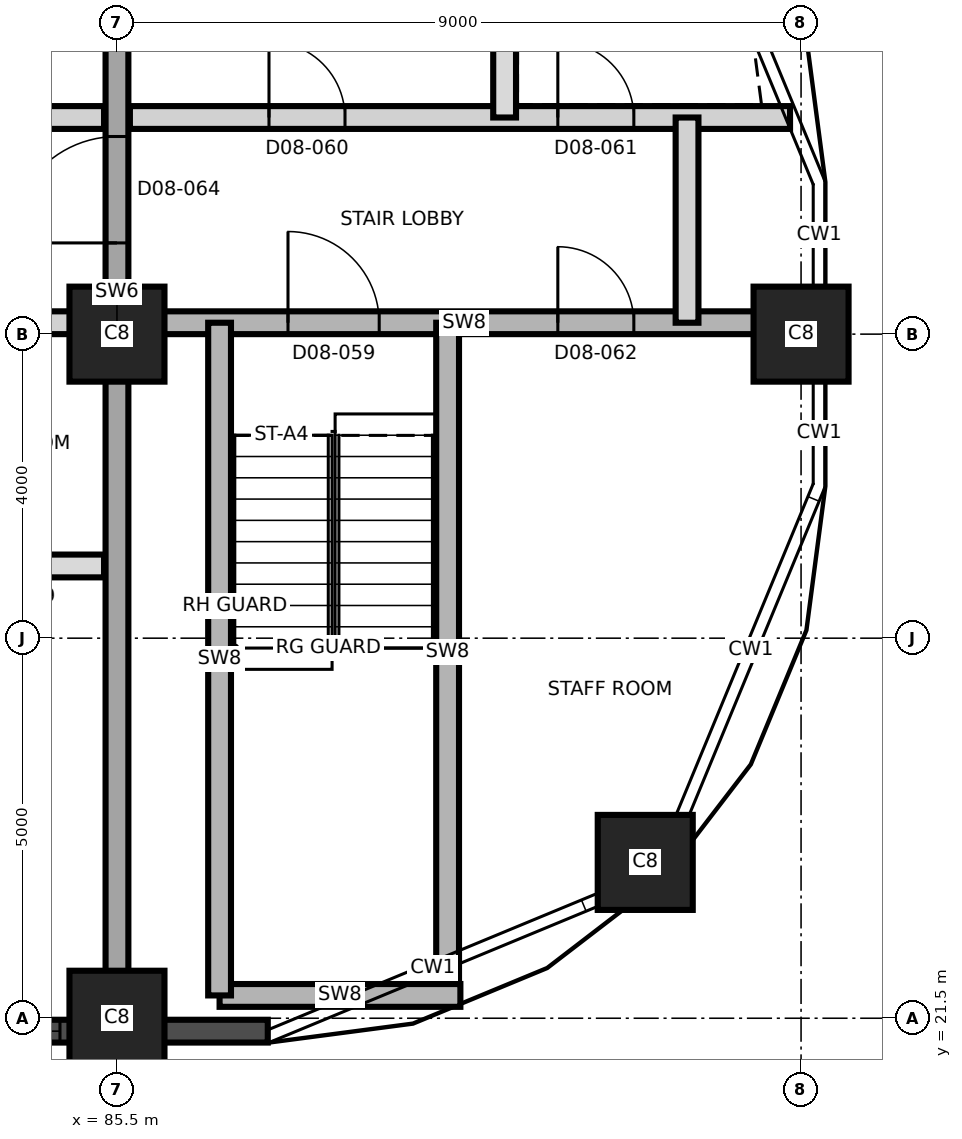
"""IFC4 building model, lengths in metres.
Left out: names, types, materials, properties, quantities, classifications, styles, units other than length and angle.
Written with IfcOpenShell. Run it as: python <this file> out.ifc"""

import sys

from ifc_helpers import new_model, si_unit, direction, frame, frame_2d, origin, origin_2d, place, context, subcontext, project, spatial, rectangle, extrude, element, fill, save


model = new_model("IFC4")
c1 = context("Model", 3, precision=1e-05, world=origin(), true_north=direction((0.0, 1.0)))
c2 = subcontext(c1, "Body", "Model", "MODEL_VIEW")
j1 = project(units=[si_unit("LENGTHUNIT", "METRE"), si_unit("PLANEANGLEUNIT", "RADIAN")], contexts=[c1])
p1 = place(None, origin())
s1 = spatial("IfcSite", under=j1, at=p1, CompositionType="ELEMENT")
p2 = place(p1, origin())
s2 = spatial("IfcBuilding", under=s1, at=p2, CompositionType="ELEMENT")
p3 = place(p2, frame((0.0, 0.0, 98.2)))
s3 = spatial("IfcBuildingStorey", under=s2, at=p3, CompositionType="ELEMENT", Elevation=98.2)
for number, where, z_axis, x_axis in (
    (1, (85.5, 21.5, 0.0), (0.0, 0.0, 1.0), (1.0, 0.0, 0.0)),
    (2, (92.45, 23.55, 0.0), (0.0, 0.0, 1.0), (1.0, 0.0, 0.0)),
    (3, (85.5, 30.5, 0.0), (0.0, 0.0, 1.0), (1.0, 0.0, 0.0)),
    (4, (94.5, 30.5, 0.0), (0.0, 0.0, 1.0), (1.0, 0.0, 0.0)),
):
    element("IfcColumn", number, at=place(p3, frame(where, z_axis=z_axis, x_axis=x_axis)), inside=s3, PredefinedType="COLUMN", context=c2, shape_type="SweptSolid", body=[
        extrude(rectangle(XDim=1.25, YDim=1.25, at=origin_2d()), origin(), (0.0, 0.0, 1.0), 3.7),
    ])
p4 = place(p3, frame((85.5, 21.53, 0.0), z_axis=(0.0, 0.0, 1.0), x_axis=(0.0, 1.0, 0.0)))
e5 = element("IfcWall", 5, at=p4, inside=s3, PredefinedType="SHEAR", context=c2, shape_type="SweptSolid", body=[
    extrude(rectangle(XDim=17.94, YDim=0.3, at=frame_2d((8.97, 0.0))), origin(), (0.0, 0.0, 1.0), 3.7),
])
p5 = place(p4, frame((10.17, 0.0, 0.0)))
e6 = element("IfcOpeningElement", 6, at=p5, cuts=e5, PredefinedType="OPENING", context=c2, shape_type="SweptSolid", body=[
    extrude(rectangle(XDim=1.4, YDim=2.1, at=frame_2d((0.7, 1.05))), frame((0.0, 0.16, 0.0), z_axis=(0.0, -1.0, 0.0), x_axis=(1.0, 0.0, 0.0)), (0.0, 0.0, 1.0), 0.32),
])
p6 = place(p3, frame((75.875, 21.33, 0.0), z_axis=(0.0, 0.0, 1.0), x_axis=(1.0, 0.0, 0.0)))
e7 = element("IfcWall", 7, at=p6, inside=s3, PredefinedType="SOLIDWALL", context=c2, shape_type="SweptSolid", body=[
    extrude(rectangle(XDim=11.609, YDim=0.3, at=frame_2d((5.805, 0.0))), origin(), (0.0, 0.0, 1.0), 3.4),
])
p7 = place(p6, frame((1.375, 0.0, 0.9)))
e8 = element("IfcOpeningElement", 8, at=p7, cuts=e7, PredefinedType="OPENING", context=c2, shape_type="SweptSolid", body=[
    extrude(rectangle(XDim=3.6, YDim=1.5, at=frame_2d((1.8, 0.75))), frame((0.0, 0.16, 0.0), z_axis=(0.0, -1.0, 0.0), x_axis=(1.0, 0.0, 0.0)), (0.0, 0.0, 1.0), 0.32),
])
p8 = place(p6, frame((5.275, 0.0, 0.9)))
e9 = element("IfcOpeningElement", 9, at=p8, cuts=e7, PredefinedType="OPENING", context=c2, shape_type="SweptSolid", body=[
    extrude(rectangle(XDim=3.6, YDim=1.5, at=frame_2d((1.8, 0.75))), frame((0.0, 0.16, 0.0), z_axis=(0.0, -1.0, 0.0), x_axis=(1.0, 0.0, 0.0)), (0.0, 0.0, 1.0), 0.32),
])
p9 = place(p3, frame((86.85, 21.8, 0.0), z_axis=(0.0, 0.0, 1.0), x_axis=(1.0, 0.0, 0.0)))
e10 = element("IfcWall", 10, at=p9, inside=s3, PredefinedType="SHEAR", context=c2, shape_type="SweptSolid", body=[
    extrude(rectangle(XDim=3.168, YDim=0.3, at=frame_2d((1.584, 0.0))), origin(), (0.0, 0.0, 1.0), 3.4),
])
p10 = place(p3, frame((82.8, 27.45, 0.0), z_axis=(0.0, 0.0, 1.0), x_axis=(1.0, 0.0, 0.0)))
e11 = element("IfcWall", 11, at=p10, inside=s3, PredefinedType="PARTITIONING", context=c2, shape_type="SweptSolid", body=[
    extrude(rectangle(XDim=2.53, YDim=0.3, at=frame_2d((1.265, 0.0))), origin(), (0.0, 0.0, 1.0), 3.4),
])
p11 = place(p10, frame((0.95, 0.0, 0.0)))
e12 = element("IfcOpeningElement", 12, at=p11, cuts=e11, PredefinedType="OPENING", context=c2, shape_type="SweptSolid", body=[
    extrude(rectangle(XDim=0.8, YDim=2.1, at=frame_2d((0.4, 1.05))), frame((0.0, 0.16, 0.0), z_axis=(0.0, -1.0, 0.0), x_axis=(1.0, 0.0, 0.0)), (0.0, 0.0, 1.0), 0.32),
])
p12 = place(p3, frame((58.8, 30.65, 0.0), z_axis=(0.0, 0.0, 1.0), x_axis=(1.0, 0.0, 0.0)))
e13 = element("IfcWall", 13, at=p12, inside=s3, PredefinedType="PARTITIONING", context=c2, shape_type="SweptSolid", body=[
    extrude(rectangle(XDim=26.53, YDim=0.3, at=frame_2d((13.265, 0.0))), origin(), (0.0, 0.0, 1.0), 3.4),
])
p13 = place(p12, frame((2.05, 0.0, 0.0)))
e14 = element("IfcOpeningElement", 14, at=p13, cuts=e13, PredefinedType="OPENING", context=c2, shape_type="SweptSolid", body=[
    extrude(rectangle(XDim=1.0, YDim=2.4, at=frame_2d((0.5, 1.2))), frame((0.0, 0.16, 0.0), z_axis=(0.0, -1.0, 0.0), x_axis=(1.0, 0.0, 0.0)), (0.0, 0.0, 1.0), 0.32),
])
p14 = place(p12, frame((9.85, 0.0, 0.0)))
e15 = element("IfcOpeningElement", 15, at=p14, cuts=e13, PredefinedType="OPENING", context=c2, shape_type="SweptSolid", body=[
    extrude(rectangle(XDim=1.0, YDim=2.1, at=frame_2d((0.5, 1.05))), frame((0.0, 0.16, 0.0), z_axis=(0.0, -1.0, 0.0), x_axis=(1.0, 0.0, 0.0)), (0.0, 0.0, 1.0), 0.32),
])
p15 = place(p12, frame((15.7, 0.0, 0.0)))
e16 = element("IfcOpeningElement", 16, at=p15, cuts=e13, PredefinedType="OPENING", context=c2, shape_type="SweptSolid", body=[
    extrude(rectangle(XDim=1.0, YDim=2.1, at=frame_2d((0.5, 1.05))), frame((0.0, 0.16, 0.0), z_axis=(0.0, -1.0, 0.0), x_axis=(1.0, 0.0, 0.0)), (0.0, 0.0, 1.0), 0.32),
])
p16 = place(p12, frame((18.835, 0.0, 0.0)))
e17 = element("IfcOpeningElement", 17, at=p16, cuts=e13, PredefinedType="OPENING", context=c2, shape_type="SweptSolid", body=[
    extrude(rectangle(XDim=1.2, YDim=2.1, at=frame_2d((0.6, 1.05))), frame((0.0, 0.16, 0.0), z_axis=(0.0, -1.0, 0.0), x_axis=(1.0, 0.0, 0.0)), (0.0, 0.0, 1.0), 0.32),
])
p17 = place(p12, frame((22.085, 0.0, 0.0)))
e18 = element("IfcOpeningElement", 18, at=p17, cuts=e13, PredefinedType="OPENING", context=c2, shape_type="SweptSolid", body=[
    extrude(rectangle(XDim=1.0, YDim=2.1, at=frame_2d((0.5, 1.05))), frame((0.0, 0.16, 0.0), z_axis=(0.0, -1.0, 0.0), x_axis=(1.0, 0.0, 0.0)), (0.0, 0.0, 1.0), 0.32),
])
p18 = place(p3, frame((85.67, 30.65, 0.0), z_axis=(0.0, 0.0, 1.0), x_axis=(1.0, 0.0, 0.0)))
e19 = element("IfcWall", 19, at=p18, inside=s3, PredefinedType="SHEAR", context=c2, shape_type="SweptSolid", body=[
    extrude(rectangle(XDim=8.8, YDim=0.3, at=frame_2d((4.4, 0.0))), origin(), (0.0, 0.0, 1.0), 3.4),
])
p19 = place(p18, frame((2.08, 0.0, 0.0)))
e20 = element("IfcOpeningElement", 20, at=p19, cuts=e19, PredefinedType="OPENING", context=c2, shape_type="SweptSolid", body=[
    extrude(rectangle(XDim=1.2, YDim=2.1, at=frame_2d((0.6, 1.05))), frame((0.0, 0.16, 0.0), z_axis=(0.0, -1.0, 0.0), x_axis=(1.0, 0.0, 0.0)), (0.0, 0.0, 1.0), 0.32),
])
p20 = place(p18, frame((5.63, 0.0, 0.0)))
e21 = element("IfcOpeningElement", 21, at=p20, cuts=e19, PredefinedType="OPENING", context=c2, shape_type="SweptSolid", body=[
    extrude(rectangle(XDim=1.0, YDim=2.1, at=frame_2d((0.5, 1.05))), frame((0.0, 0.16, 0.0), z_axis=(0.0, -1.0, 0.0), x_axis=(1.0, 0.0, 0.0)), (0.0, 0.0, 1.0), 0.32),
])
p21 = place(p3, frame((58.8, 33.35, 0.0), z_axis=(0.0, 0.0, 1.0), x_axis=(1.0, 0.0, 0.0)))
e22 = element("IfcWall", 22, at=p21, inside=s3, PredefinedType="PARTITIONING", context=c2, shape_type="SweptSolid", body=[
    extrude(rectangle(XDim=26.53, YDim=0.3, at=frame_2d((13.265, 0.0))), origin(), (0.0, 0.0, 1.0), 3.4),
])
p22 = place(p21, frame((2.75, 0.0, 0.0)))
e23 = element("IfcOpeningElement", 23, at=p22, cuts=e22, PredefinedType="OPENING", context=c2, shape_type="SweptSolid", body=[
    extrude(rectangle(XDim=1.0, YDim=2.1, at=frame_2d((0.5, 1.05))), frame((0.0, 0.16, 0.0), z_axis=(0.0, -1.0, 0.0), x_axis=(1.0, 0.0, 0.0)), (0.0, 0.0, 1.0), 0.32),
])
p23 = place(p21, frame((5.7, 0.0, 0.0)))
e24 = element("IfcOpeningElement", 24, at=p23, cuts=e22, PredefinedType="OPENING", context=c2, shape_type="SweptSolid", body=[
    extrude(rectangle(XDim=1.4, YDim=2.1, at=frame_2d((0.7, 1.05))), frame((0.0, 0.16, 0.0), z_axis=(0.0, -1.0, 0.0), x_axis=(1.0, 0.0, 0.0)), (0.0, 0.0, 1.0), 0.32),
])
p24 = place(p21, frame((14.35, 0.0, 0.0)))
e25 = element("IfcOpeningElement", 25, at=p24, cuts=e22, PredefinedType="OPENING", context=c2, shape_type="SweptSolid", body=[
    extrude(rectangle(XDim=1.0, YDim=2.4, at=frame_2d((0.5, 1.2))), frame((0.0, 0.16, 0.0), z_axis=(0.0, -1.0, 0.0), x_axis=(1.0, 0.0, 0.0)), (0.0, 0.0, 1.0), 0.32),
])
p25 = place(p21, frame((18.835, 0.0, 0.0)))
e26 = element("IfcOpeningElement", 26, at=p25, cuts=e22, PredefinedType="OPENING", context=c2, shape_type="SweptSolid", body=[
    extrude(rectangle(XDim=1.2, YDim=2.1, at=frame_2d((0.6, 1.05))), frame((0.0, 0.16, 0.0), z_axis=(0.0, -1.0, 0.0), x_axis=(1.0, 0.0, 0.0)), (0.0, 0.0, 1.0), 0.32),
])
p26 = place(p21, frame((22.085, 0.0, 0.0)))
e27 = element("IfcOpeningElement", 27, at=p26, cuts=e22, PredefinedType="OPENING", context=c2, shape_type="SweptSolid", body=[
    extrude(rectangle(XDim=1.0, YDim=2.1, at=frame_2d((0.5, 1.05))), frame((0.0, 0.16, 0.0), z_axis=(0.0, -1.0, 0.0), x_axis=(1.0, 0.0, 0.0)), (0.0, 0.0, 1.0), 0.32),
])
p27 = place(p3, frame((85.67, 33.35, 0.0), z_axis=(0.0, 0.0, 1.0), x_axis=(1.0, 0.0, 0.0)))
e28 = element("IfcWall", 28, at=p27, inside=s3, PredefinedType="PARTITIONING", context=c2, shape_type="SweptSolid", body=[
    extrude(rectangle(XDim=8.685, YDim=0.3, at=frame_2d((4.343, 0.0))), origin(), (0.0, 0.0, 1.0), 3.4),
])
p28 = place(p27, frame((1.83, 0.0, 0.0)))
e29 = element("IfcOpeningElement", 29, at=p28, cuts=e28, PredefinedType="OPENING", context=c2, shape_type="SweptSolid", body=[
    extrude(rectangle(XDim=1.0, YDim=2.1, at=frame_2d((0.5, 1.05))), frame((0.0, 0.16, 0.0), z_axis=(0.0, -1.0, 0.0), x_axis=(1.0, 0.0, 0.0)), (0.0, 0.0, 1.0), 0.32),
])
p29 = place(p27, frame((5.63, 0.0, 0.0)))
e30 = element("IfcOpeningElement", 30, at=p29, cuts=e28, PredefinedType="OPENING", context=c2, shape_type="SweptSolid", body=[
    extrude(rectangle(XDim=1.0, YDim=2.1, at=frame_2d((0.5, 1.05))), frame((0.0, 0.16, 0.0), z_axis=(0.0, -1.0, 0.0), x_axis=(1.0, 0.0, 0.0)), (0.0, 0.0, 1.0), 0.32),
])
p30 = place(p3, frame((86.85, 21.8, 0.0), z_axis=(0.0, 0.0, 1.0), x_axis=(0.0, 1.0, 0.0)))
e31 = element("IfcWall", 31, at=p30, inside=s3, PredefinedType="SHEAR", context=c2, shape_type="SweptSolid", body=[
    extrude(rectangle(XDim=8.85, YDim=0.3, at=frame_2d((4.425, 0.0))), origin(), (0.0, 0.0, 1.0), 3.4),
])
p31 = place(p3, frame((89.85, 21.997, 0.0), z_axis=(0.0, 0.0, 1.0), x_axis=(0.0, 1.0, 0.0)))
e32 = element("IfcWall", 32, at=p31, inside=s3, PredefinedType="SHEAR", context=c2, shape_type="SweptSolid", body=[
    extrude(rectangle(XDim=8.653, YDim=0.3, at=frame_2d((4.326, 0.0))), origin(), (0.0, 0.0, 1.0), 3.4),
])
p32 = place(p3, frame((90.6, 33.35, 0.0), z_axis=(0.0, 0.0, 1.0), x_axis=(0.0, 1.0, 0.0)))
e33 = element("IfcWall", 33, at=p32, inside=s3, PredefinedType="PARTITIONING", context=c2, shape_type="SweptSolid", body=[
    extrude(rectangle(XDim=5.603, YDim=0.3, at=frame_2d((2.801, 0.0))), origin(), (0.0, 0.0, 1.0), 3.4),
])
p33 = place(p3, frame((93.0, 30.65, 0.0), z_axis=(0.0, 0.0, 1.0), x_axis=(0.0, 1.0, 0.0)))
e34 = element("IfcWall", 34, at=p33, inside=s3, PredefinedType="PARTITIONING", context=c2, shape_type="SweptSolid", body=[
    extrude(rectangle(XDim=2.7, YDim=0.3, at=frame_2d((1.35, 0.0))), origin(), (0.0, 0.0, 1.0), 3.4),
])
p34 = place(p8, origin())
e35 = element("IfcWindow", 35, at=p34, inside=s3, PartitioningType="SINGLE_PANEL", PredefinedType="WINDOW", context=c2, shape_type="SweptSolid", body=[
    extrude(rectangle(XDim=3.6, YDim=1.5, at=frame_2d((1.8, 0.75))), frame((0.0, 0.03, 0.0), z_axis=(0.0, -1.0, 0.0), x_axis=(1.0, 0.0, 0.0)), (0.0, 0.0, 1.0), 0.06),
])
fill(e9, e35)
p35 = place(p19, origin())
e36 = element("IfcDoor", 36, at=p35, inside=s3, OperationType="SINGLE_SWING_LEFT", PredefinedType="DOOR", context=c2, shape_type="SweptSolid", body=[
    extrude(rectangle(XDim=1.2, YDim=2.1, at=frame_2d((0.6, 1.05))), frame((0.0, 0.025, 0.0), z_axis=(0.0, -1.0, 0.0), x_axis=(1.0, 0.0, 0.0)), (0.0, 0.0, 1.0), 0.05),
])
fill(e20, e36)
p36 = place(p28, origin())
e37 = element("IfcDoor", 37, at=p36, inside=s3, OperationType="SINGLE_SWING_LEFT", PredefinedType="DOOR", context=c2, shape_type="SweptSolid", body=[
    extrude(rectangle(XDim=1.0, YDim=2.1, at=frame_2d((0.5, 1.05))), frame((0.0, 0.025, 0.0), z_axis=(0.0, -1.0, 0.0), x_axis=(1.0, 0.0, 0.0)), (0.0, 0.0, 1.0), 0.05),
])
fill(e29, e37)
p37 = place(p29, origin())
e38 = element("IfcDoor", 38, at=p37, inside=s3, OperationType="SINGLE_SWING_RIGHT", PredefinedType="DOOR", context=c2, shape_type="SweptSolid", body=[
    extrude(rectangle(XDim=1.0, YDim=2.1, at=frame_2d((0.5, 1.05))), frame((0.0, 0.025, 0.0), z_axis=(0.0, -1.0, 0.0), x_axis=(1.0, 0.0, 0.0)), (0.0, 0.0, 1.0), 0.05),
])
fill(e30, e38)
p38 = place(p20, origin())
e39 = element("IfcDoor", 39, at=p38, inside=s3, OperationType="SINGLE_SWING_LEFT", PredefinedType="DOOR", context=c2, shape_type="SweptSolid", body=[
    extrude(rectangle(XDim=1.0, YDim=2.1, at=frame_2d((0.5, 1.05))), frame((0.0, 0.025, 0.0), z_axis=(0.0, -1.0, 0.0), x_axis=(1.0, 0.0, 0.0)), (0.0, 0.0, 1.0), 0.05),
])
fill(e21, e39)
p39 = place(p5, origin())
e40 = element("IfcDoor", 40, at=p39, inside=s3, OperationType="SINGLE_SWING_RIGHT", PredefinedType="DOOR", context=c2, shape_type="SweptSolid", body=[
    extrude(rectangle(XDim=1.4, YDim=2.1, at=frame_2d((0.7, 1.05))), frame((0.0, 0.025, 0.0), z_axis=(0.0, -1.0, 0.0), x_axis=(1.0, 0.0, 0.0)), (0.0, 0.0, 1.0), 0.05),
])
fill(e6, e40)
save(model, sys.argv[1])
